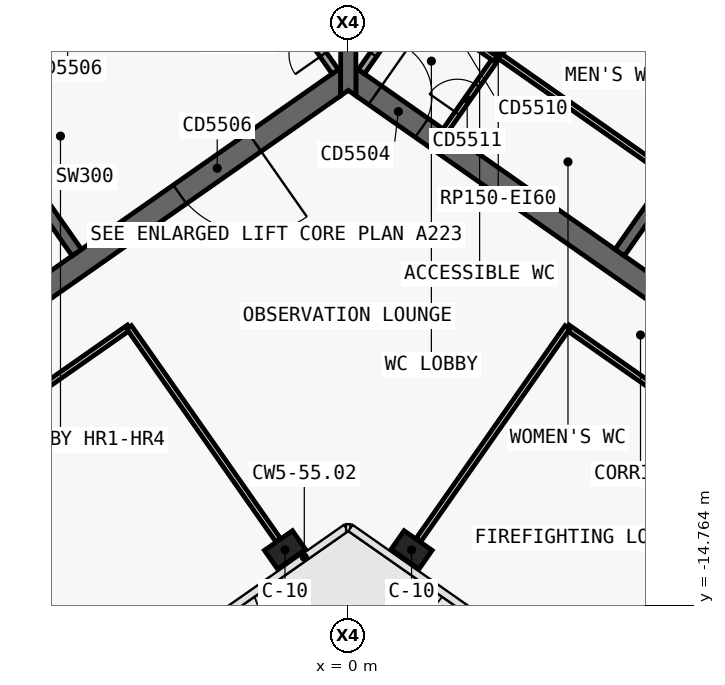
"""IFC4 building model, lengths in metres.
Left out: names, types, materials, properties, quantities, classifications, styles, units other than length and angle.
Written with IfcOpenShell. Run it as: python <this file> out.ifc"""

import sys

from ifc_helpers import new_model, si_unit, direction, frame, frame_2d, origin, origin_2d, place, context, subcontext, project, spatial, polyline, rectangle, outline, extrude, element, fill, save


model = new_model("IFC4")
c1 = context("Model", 3, precision=1e-05, world=origin(), true_north=direction((0.0, 1.0)))
c2 = subcontext(c1, "Body", "Model", "MODEL_VIEW")
j1 = project(units=[si_unit("LENGTHUNIT", "METRE"), si_unit("PLANEANGLEUNIT", "RADIAN")], contexts=[c1])
p1 = place(None, origin())
s1 = spatial("IfcSite", under=j1, at=p1, CompositionType="ELEMENT")
p2 = place(p1, origin())
s2 = spatial("IfcBuilding", under=s1, at=p2, CompositionType="ELEMENT")
p3 = place(p2, frame((0.0, 0.0, 307.3)))
s3 = spatial("IfcBuildingStorey", under=s2, at=p3, CompositionType="ELEMENT", Elevation=307.3)
p4 = place(p3, frame((-0.028, 12.066, 0.0), z_axis=(0.0, 0.0, 1.0), x_axis=(-0.819151382952, -0.573577380837, 0.0)))
e1 = element("IfcWall", 1, at=p4, inside=s3, PredefinedType="SHEAR", context=c2, shape_type="SweptSolid", body=[
    extrude(outline(polyline([(33.898, 0.3), (0.42, 0.3), (0.0, -0.3), (33.898, -0.3), (33.898, 0.3)])), origin(), (0.0, 0.0, 1.0), 6.0),
])
p5 = place(p3, frame((-0.028, -0.874, 0.0), z_axis=(0.0, 0.0, 1.0), x_axis=(-0.819150035022, -0.573579305871, 0.0)))
e2 = element("IfcWall", 2, at=p5, inside=s3, PredefinedType="SHEAR", context=c2, shape_type="SweptSolid", body=[
    extrude(outline(polyline([(26.476, 0.3), (0.42, 0.3), (0.0, -0.3), (26.476, -0.3), (26.476, 0.3)])), origin(), (0.0, 0.0, 1.0), 6.0),
])
p6 = place(p5, frame((2.976, 0.0, 0.0)))
e3 = element("IfcOpeningElement", 3, at=p6, cuts=e2, PredefinedType="OPENING", context=c2, shape_type="SweptSolid", body=[
    extrude(rectangle(XDim=2.4, YDim=2.1, at=frame_2d((1.2, 1.05))), frame((0.0, 0.31, 0.0), z_axis=(0.0, -1.0, 0.0), x_axis=(1.0, 0.0, 0.0)), (0.0, 0.0, 1.0), 0.62),
])
p7 = place(p5, frame((11.776, 0.0, 0.0)))
e4 = element("IfcOpeningElement", 4, at=p7, cuts=e2, PredefinedType="OPENING", context=c2, shape_type="SweptSolid", body=[
    extrude(rectangle(XDim=2.4, YDim=2.1, at=frame_2d((1.2, 1.05))), frame((0.0, 0.31, 0.0), z_axis=(0.0, -1.0, 0.0), x_axis=(1.0, 0.0, 0.0)), (0.0, 0.0, 1.0), 0.62),
])
p8 = place(p3, frame((-7.143, -5.49, 0.0), z_axis=(0.0, 0.0, 1.0), x_axis=(-0.573617744349, 0.819123118565, 0.0)))
e5 = element("IfcWall", 5, at=p8, inside=s3, PredefinedType="SHEAR", context=c2, shape_type="SweptSolid", body=[
    extrude(outline(polyline([(4.85, 0.15), (0.0, 0.15), (0.0, -0.15), (4.85, -0.15), (4.85, 0.15)])), origin(), (0.0, 0.0, 1.0), 6.0),
])
p9 = place(p3, frame((-2.638, 3.768, 0.0), z_axis=(0.0, 0.0, 1.0), x_axis=(-0.819155014212, -0.573572194837, 0.0)))
e6 = element("IfcWall", 6, at=p9, inside=s3, PredefinedType="SHEAR", context=c2, shape_type="SweptSolid", body=[
    extrude(outline(polyline([(26.4, 0.15), (0.0, 0.15), (0.0, -0.15), (26.4, -0.15), (26.4, 0.15)])), origin(), (0.0, 0.0, 1.0), 6.0),
])
p10 = place(p9, frame((1.169, 0.0, 0.0)))
e7 = element("IfcOpeningElement", 7, at=p10, cuts=e6, PredefinedType="OPENING", context=c2, shape_type="SweptSolid", body=[
    extrude(rectangle(XDim=1.1, YDim=2.1, at=frame_2d((0.55, 1.05))), frame((0.0, 0.16, 0.0), z_axis=(0.0, -1.0, 0.0), x_axis=(1.0, 0.0, 0.0)), (0.0, 0.0, 1.0), 0.32),
])
p11 = place(p9, frame((3.206, 0.0, 0.0)))
e8 = element("IfcOpeningElement", 8, at=p11, cuts=e6, PredefinedType="OPENING", context=c2, shape_type="SweptSolid", body=[
    extrude(rectangle(XDim=1.1, YDim=2.1, at=frame_2d((0.55, 1.05))), frame((0.0, 0.16, 0.0), z_axis=(0.0, -1.0, 0.0), x_axis=(1.0, 0.0, 0.0)), (0.0, 0.0, 1.0), 0.32),
])
p12 = place(p9, frame((5.244, 0.0, 0.0)))
e9 = element("IfcOpeningElement", 9, at=p12, cuts=e6, PredefinedType="OPENING", context=c2, shape_type="SweptSolid", body=[
    extrude(rectangle(XDim=1.1, YDim=2.1, at=frame_2d((0.55, 1.05))), frame((0.0, 0.16, 0.0), z_axis=(0.0, -1.0, 0.0), x_axis=(1.0, 0.0, 0.0)), (0.0, 0.0, 1.0), 0.32),
])
p13 = place(p9, frame((7.281, 0.0, 0.0)))
e10 = element("IfcOpeningElement", 10, at=p13, cuts=e6, PredefinedType="OPENING", context=c2, shape_type="SweptSolid", body=[
    extrude(rectangle(XDim=1.1, YDim=2.1, at=frame_2d((0.55, 1.05))), frame((0.0, 0.16, 0.0), z_axis=(0.0, -1.0, 0.0), x_axis=(1.0, 0.0, 0.0)), (0.0, 0.0, 1.0), 0.32),
])
p14 = place(p9, frame((9.688, 0.0, 0.0)))
e11 = element("IfcOpeningElement", 11, at=p14, cuts=e6, PredefinedType="OPENING", context=c2, shape_type="SweptSolid", body=[
    extrude(rectangle(XDim=1.1, YDim=2.1, at=frame_2d((0.55, 1.05))), frame((0.0, 0.16, 0.0), z_axis=(0.0, -1.0, 0.0), x_axis=(1.0, 0.0, 0.0)), (0.0, 0.0, 1.0), 0.32),
])
p15 = place(p9, frame((11.863, 0.0, 0.0)))
e12 = element("IfcOpeningElement", 12, at=p15, cuts=e6, PredefinedType="OPENING", context=c2, shape_type="SweptSolid", body=[
    extrude(rectangle(XDim=1.1, YDim=2.1, at=frame_2d((0.55, 1.05))), frame((0.0, 0.16, 0.0), z_axis=(0.0, -1.0, 0.0), x_axis=(1.0, 0.0, 0.0)), (0.0, 0.0, 1.0), 0.32),
])
p16 = place(p9, frame((15.175, 0.0, 0.0)))
e13 = element("IfcOpeningElement", 13, at=p16, cuts=e6, PredefinedType="OPENING", context=c2, shape_type="SweptSolid", body=[
    extrude(rectangle(XDim=1.0, YDim=2.1, at=frame_2d((0.5, 1.05))), frame((0.0, 0.16, 0.0), z_axis=(0.0, -1.0, 0.0), x_axis=(1.0, 0.0, 0.0)), (0.0, 0.0, 1.0), 0.32),
])
p17 = place(p3, frame((0.028, 12.066, 0.0), z_axis=(0.0, 0.0, 1.0), x_axis=(0.819151382952, -0.573577380837, 0.0)))
e14 = element("IfcWall", 14, at=p17, inside=s3, PredefinedType="SHEAR", context=c2, shape_type="SweptSolid", body=[
    extrude(outline(polyline([(33.898, 0.3), (0.0, 0.3), (0.42, -0.3), (33.898, -0.3), (33.898, 0.3)])), origin(), (0.0, 0.0, 1.0), 6.0),
])
p18 = place(p3, frame((0.028, -0.874, 0.0), z_axis=(0.0, 0.0, 1.0), x_axis=(0.819150035022, -0.573579305871, 0.0)))
e15 = element("IfcWall", 15, at=p18, inside=s3, PredefinedType="SHEAR", context=c2, shape_type="SweptSolid", body=[
    extrude(outline(polyline([(26.476, 0.3), (0.0, 0.3), (0.42, -0.3), (26.476, -0.3), (26.476, 0.3)])), origin(), (0.0, 0.0, 1.0), 6.0),
])
p19 = place(p18, frame((0.826, 0.0, 0.0)))
e16 = element("IfcOpeningElement", 16, at=p19, cuts=e15, PredefinedType="OPENING", context=c2, shape_type="SweptSolid", body=[
    extrude(rectangle(XDim=1.5, YDim=2.1, at=frame_2d((0.75, 1.05))), frame((0.0, 0.31, 0.0), z_axis=(0.0, -1.0, 0.0), x_axis=(1.0, 0.0, 0.0)), (0.0, 0.0, 1.0), 0.62),
])
p20 = place(p18, frame((12.226, 0.0, 0.0)))
e17 = element("IfcOpeningElement", 17, at=p20, cuts=e15, PredefinedType="OPENING", context=c2, shape_type="SweptSolid", body=[
    extrude(rectangle(XDim=1.5, YDim=2.1, at=frame_2d((0.75, 1.05))), frame((0.0, 0.31, 0.0), z_axis=(0.0, -1.0, 0.0), x_axis=(1.0, 0.0, 0.0)), (0.0, 0.0, 1.0), 0.62),
])
p21 = place(p3, frame((7.143, -5.49, 0.0), z_axis=(0.0, 0.0, 1.0), x_axis=(0.573617744349, 0.819123118565, 0.0)))
e18 = element("IfcWall", 18, at=p21, inside=s3, PredefinedType="SHEAR", context=c2, shape_type="SweptSolid", body=[
    extrude(outline(polyline([(0.0, 0.15), (0.0, -0.15), (4.85, -0.15), (4.85, 0.15), (0.0, 0.15)])), origin(), (0.0, 0.0, 1.0), 6.0),
])
p22 = place(p3, frame((2.638, 3.768, 0.0), z_axis=(0.0, 0.0, 1.0), x_axis=(0.819155014212, -0.573572194837, 0.0)))
e19 = element("IfcWall", 19, at=p22, inside=s3, PredefinedType="SHEAR", context=c2, shape_type="SweptSolid", body=[
    extrude(outline(polyline([(0.0, 0.15), (0.0, -0.15), (26.4, -0.15), (26.4, 0.15), (0.0, 0.15)])), origin(), (0.0, 0.0, 1.0), 6.0),
])
p23 = place(p22, frame((9.637, 0.0, 0.0)))
e20 = element("IfcOpeningElement", 20, at=p23, cuts=e19, PredefinedType="OPENING", context=c2, shape_type="SweptSolid", body=[
    extrude(rectangle(XDim=1.2, YDim=2.1, at=frame_2d((0.6, 1.05))), frame((0.0, 0.16, 0.0), z_axis=(0.0, -1.0, 0.0), x_axis=(1.0, 0.0, 0.0)), (0.0, 0.0, 1.0), 0.32),
])
p24 = place(p22, frame((11.812, 0.0, 0.0)))
e21 = element("IfcOpeningElement", 21, at=p24, cuts=e19, PredefinedType="OPENING", context=c2, shape_type="SweptSolid", body=[
    extrude(rectangle(XDim=1.2, YDim=2.1, at=frame_2d((0.6, 1.05))), frame((0.0, 0.16, 0.0), z_axis=(0.0, -1.0, 0.0), x_axis=(1.0, 0.0, 0.0)), (0.0, 0.0, 1.0), 0.32),
])
p25 = place(p22, frame((13.988, 0.0, 0.0)))
e22 = element("IfcOpeningElement", 22, at=p25, cuts=e19, PredefinedType="OPENING", context=c2, shape_type="SweptSolid", body=[
    extrude(rectangle(XDim=1.2, YDim=2.1, at=frame_2d((0.6, 1.05))), frame((0.0, 0.16, 0.0), z_axis=(0.0, -1.0, 0.0), x_axis=(1.0, 0.0, 0.0)), (0.0, 0.0, 1.0), 0.32),
])
p26 = place(p22, frame((16.262, 0.0, 0.0)))
e23 = element("IfcOpeningElement", 23, at=p26, cuts=e19, PredefinedType="OPENING", context=c2, shape_type="SweptSolid", body=[
    extrude(rectangle(XDim=1.0, YDim=2.1, at=frame_2d((0.5, 1.05))), frame((0.0, 0.16, 0.0), z_axis=(0.0, -1.0, 0.0), x_axis=(1.0, 0.0, 0.0)), (0.0, 0.0, 1.0), 0.32),
])
p27 = place(p3, frame((0.0, -1.361, 0.0), z_axis=(0.0, 0.0, 1.0), x_axis=(0.0, 1.0, 0.0)))
e24 = element("IfcWall", 24, at=p27, inside=s3, PredefinedType="SHEAR", context=c2, shape_type="SweptSolid", body=[
    extrude(outline(polyline([(0.14, 0.2), (0.0, 0.2), (0.14, 0.0), (0.0, -0.2), (0.14, -0.2), (1.012, -0.2), (12.94, -0.2), (13.813, -0.2), (13.893, -0.2), (13.933, -0.172), (13.813, 0.0), (13.933, 0.172), (13.893, 0.2), (13.813, 0.2), (12.94, 0.2), (1.012, 0.2), (0.14, 0.2)])), origin(), (0.0, 0.0, 1.0), 6.0),
])
for number, where, z_axis, x_axis in (
    (25, (-1.665, -13.313, 0.0), (0.0, 0.0, 1.0), (-0.819, -0.574, 0.0)),
    (26, (1.665, -13.313, 0.0), (0.0, 0.0, 1.0), (0.819, -0.574, 0.0)),
):
    element("IfcColumn", number, at=place(p3, frame(where, z_axis=z_axis, x_axis=x_axis)), inside=s3, PredefinedType="COLUMN", context=c2, shape_type="SweptSolid", body=[
        extrude(rectangle(XDim=0.9, YDim=0.6, at=origin_2d()), origin(), (0.0, 0.0, 1.0), 6.0),
    ])
p28 = place(p3, frame((2.556, -2.278, 0.0), z_axis=(0.0, 0.0, 1.0), x_axis=(0.573560315113, 0.819163332265, 0.0)))
e27 = element("IfcWall", 27, at=p28, inside=s3, PredefinedType="PARTITIONING", context=c2, shape_type="SweptSolid", body=[
    extrude(rectangle(XDim=4.85, YDim=0.15, at=frame_2d((2.425, 0.0))), origin(), (0.0, 0.0, 1.0), 5.72),
])
p29 = place(p28, frame((0.55, 0.0, 0.0)))
e28 = element("IfcOpeningElement", 28, at=p29, cuts=e27, PredefinedType="OPENING", context=c2, shape_type="SweptSolid", body=[
    extrude(rectangle(XDim=0.9, YDim=2.1, at=frame_2d((0.45, 1.05))), frame((0.0, 0.085, 0.0), z_axis=(0.0, -1.0, 0.0), x_axis=(1.0, 0.0, 0.0)), (0.0, 0.0, 1.0), 0.17),
])
p30 = place(p28, frame((3.075, 0.0, 0.0)))
e29 = element("IfcOpeningElement", 29, at=p30, cuts=e27, PredefinedType="OPENING", context=c2, shape_type="SweptSolid", body=[
    extrude(rectangle(XDim=0.9, YDim=2.1, at=frame_2d((0.45, 1.05))), frame((0.0, 0.085, 0.0), z_axis=(0.0, -1.0, 0.0), x_axis=(1.0, 0.0, 0.0)), (0.0, 0.0, 1.0), 0.17),
])
p31 = place(p3, frame((1.745, 1.097, 0.0), z_axis=(0.0, 0.0, 1.0), x_axis=(0.819178980414, -0.573537965655, 0.0)))
e30 = element("IfcWall", 30, at=p31, inside=s3, PredefinedType="PARTITIONING", context=c2, shape_type="SweptSolid", body=[
    extrude(rectangle(XDim=2.6, YDim=0.15, at=frame_2d((1.3, 0.0))), origin(), (0.0, 0.0, 1.0), 5.72),
])
p32 = place(p31, frame((0.85, 0.0, 0.0)))
e31 = element("IfcOpeningElement", 31, at=p32, cuts=e30, PredefinedType="OPENING", context=c2, shape_type="SweptSolid", body=[
    extrude(rectangle(XDim=0.9, YDim=2.1, at=frame_2d((0.45, 1.05))), frame((0.0, 0.085, 0.0), z_axis=(0.0, -1.0, 0.0), x_axis=(1.0, 0.0, 0.0)), (0.0, 0.0, 1.0), 0.17),
])
p33 = place(p3, frame((3.947, -0.292, 0.0), z_axis=(0.0, 0.0, 1.0), x_axis=(0.819151939971, -0.573576585332, 0.0)))
e32 = element("IfcWall", 32, at=p33, inside=s3, PredefinedType="PARTITIONING", context=c2, shape_type="SweptSolid", body=[
    extrude(rectangle(XDim=5.45, YDim=0.15, at=frame_2d((2.725, 0.0))), origin(), (0.0, 0.0, 1.0), 5.72),
])
p34 = place(p3, frame((-0.344, -0.729, 0.0), z_axis=(0.0, 0.0, 1.0), x_axis=(-0.573560315113, 0.819163332265, 0.0)))
e33 = element("IfcWall", 33, at=p34, inside=s3, PredefinedType="SOLIDWALL", context=c2, shape_type="SweptSolid", body=[
    extrude(rectangle(XDim=4.85, YDim=0.2, at=frame_2d((2.425, 0.0))), origin(), (0.0, 0.0, 1.0), 5.72),
])
p35 = place(p34, frame((0.55, 0.0, 0.0)))
e34 = element("IfcOpeningElement", 34, at=p35, cuts=e33, PredefinedType="OPENING", context=c2, shape_type="SweptSolid", body=[
    extrude(rectangle(XDim=0.9, YDim=2.1, at=frame_2d((0.45, 1.05))), frame((0.0, 0.11, 0.0), z_axis=(0.0, -1.0, 0.0), x_axis=(1.0, 0.0, 0.0)), (0.0, 0.0, 1.0), 0.22),
])
p36 = place(p3, frame((0.344, -0.729, 0.0), z_axis=(0.0, 0.0, 1.0), x_axis=(0.573560315113, 0.819163332265, 0.0)))
e35 = element("IfcWall", 35, at=p36, inside=s3, PredefinedType="SOLIDWALL", context=c2, shape_type="SweptSolid", body=[
    extrude(rectangle(XDim=4.85, YDim=0.2, at=frame_2d((2.425, 0.0))), origin(), (0.0, 0.0, 1.0), 5.72),
])
p37 = place(p36, frame((0.55, 0.0, 0.0)))
e36 = element("IfcOpeningElement", 36, at=p37, cuts=e35, PredefinedType="OPENING", context=c2, shape_type="SweptSolid", body=[
    extrude(rectangle(XDim=0.9, YDim=2.1, at=frame_2d((0.45, 1.05))), frame((0.0, 0.11, 0.0), z_axis=(0.0, -1.0, 0.0), x_axis=(1.0, 0.0, 0.0)), (0.0, 0.0, 1.0), 0.22),
])
p38 = place(p3, frame((20.513, -17.781, 0.0), z_axis=(0.0, 0.0, 1.0), x_axis=(-0.819153544995, 0.573574293115, 0.0)))
e37 = element("IfcWall", 37, at=p38, inside=s3, PredefinedType="PARTITIONING", context=c2, shape_type="SweptSolid", body=[
    extrude(rectangle(XDim=18.002, YDim=0.15, at=frame_2d((9.001, 0.0))), origin(), (0.0, 0.0, 1.0), 5.15),
])
p39 = place(p38, frame((8.401, 0.0, 0.0)))
e38 = element("IfcOpeningElement", 38, at=p39, cuts=e37, PredefinedType="OPENING", context=c2, shape_type="SweptSolid", body=[
    extrude(rectangle(XDim=1.2, YDim=2.4, at=frame_2d((0.6, 1.2))), frame((0.0, 0.085, 0.0), z_axis=(0.0, -1.0, 0.0), x_axis=(1.0, 0.0, 0.0)), (0.0, 0.0, 1.0), 0.17),
])
p40 = place(p3, frame((-5.766, -7.456, 0.0), z_axis=(0.0, 0.0, 1.0), x_axis=(-0.819153544995, -0.573574293115, 0.0)))
e39 = element("IfcWall", 39, at=p40, inside=s3, PredefinedType="PARTITIONING", context=c2, shape_type="SweptSolid", body=[
    extrude(rectangle(XDim=18.002, YDim=0.15, at=frame_2d((9.001, 0.0))), origin(), (0.0, 0.0, 1.0), 5.15),
])
p41 = place(p40, frame((8.401, 0.0, 0.0)))
e40 = element("IfcOpeningElement", 40, at=p41, cuts=e39, PredefinedType="OPENING", context=c2, shape_type="SweptSolid", body=[
    extrude(rectangle(XDim=1.2, YDim=2.4, at=frame_2d((0.6, 1.2))), frame((0.0, 0.085, 0.0), z_axis=(0.0, -1.0, 0.0), x_axis=(1.0, 0.0, 0.0)), (0.0, 0.0, 1.0), 0.17),
])
p42 = place(p3, frame((1.849, -13.051, 0.0), z_axis=(0.0, 0.0, 1.0), x_axis=(0.573577493031, 0.819151304393, 0.0)))
e41 = element("IfcWall", 41, at=p42, inside=s3, PredefinedType="PARTITIONING", context=c2, shape_type="SweptSolid", body=[
    extrude(rectangle(XDim=6.83, YDim=0.15, at=frame_2d((3.415, 0.0))), origin(), (0.0, 0.0, 1.0), 5.15),
])
p43 = place(p3, frame((-1.849, -13.051, 0.0), z_axis=(0.0, 0.0, 1.0), x_axis=(-0.57357985571, 0.819149650018, 0.0)))
e42 = element("IfcWall", 42, at=p43, inside=s3, PredefinedType="PARTITIONING", context=c2, shape_type="SweptSolid", body=[
    extrude(rectangle(XDim=6.832, YDim=0.15, at=frame_2d((3.416, 0.0))), origin(), (0.0, 0.0, 1.0), 5.15),
])
p44 = place(p6, origin())
e43 = element("IfcDoor", 43, at=p44, inside=s3, OperationType="DOUBLE_DOOR_SINGLE_SWING", PredefinedType="DOOR", context=c2, shape_type="SweptSolid", body=[
    extrude(rectangle(XDim=2.4, YDim=2.1, at=frame_2d((1.2, 1.05))), frame((0.0, 0.025, 0.0), z_axis=(0.0, -1.0, 0.0), x_axis=(1.0, 0.0, 0.0)), (0.0, 0.0, 1.0), 0.05),
])
fill(e3, e43)
p45 = place(p29, origin())
e44 = element("IfcDoor", 44, at=p45, inside=s3, OperationType="SINGLE_SWING_RIGHT", PredefinedType="DOOR", context=c2, shape_type="SweptSolid", body=[
    extrude(rectangle(XDim=0.9, YDim=2.1, at=frame_2d((0.45, 1.05))), frame((0.0, 0.025, 0.0), z_axis=(0.0, -1.0, 0.0), x_axis=(1.0, 0.0, 0.0)), (0.0, 0.0, 1.0), 0.05),
])
fill(e28, e44)
p46 = place(p19, origin())
e45 = element("IfcDoor", 45, at=p46, inside=s3, OperationType="SINGLE_SWING_RIGHT", PredefinedType="DOOR", context=c2, shape_type="SweptSolid", body=[
    extrude(rectangle(XDim=1.5, YDim=2.1, at=frame_2d((0.75, 1.05))), frame((0.0, 0.025, 0.0), z_axis=(0.0, -1.0, 0.0), x_axis=(1.0, 0.0, 0.0)), (0.0, 0.0, 1.0), 0.05),
])
fill(e16, e45)
p47 = place(p35, origin())
e46 = element("IfcDoor", 46, at=p47, inside=s3, OperationType="SINGLE_SWING_RIGHT", PredefinedType="DOOR", context=c2, shape_type="SweptSolid", body=[
    extrude(rectangle(XDim=0.9, YDim=2.1, at=frame_2d((0.45, 1.05))), frame((0.0, 0.025, 0.0), z_axis=(0.0, -1.0, 0.0), x_axis=(1.0, 0.0, 0.0)), (0.0, 0.0, 1.0), 0.05),
])
fill(e34, e46)
p48 = place(p37, origin())
e47 = element("IfcDoor", 47, at=p48, inside=s3, OperationType="SINGLE_SWING_RIGHT", PredefinedType="DOOR", context=c2, shape_type="SweptSolid", body=[
    extrude(rectangle(XDim=0.9, YDim=2.1, at=frame_2d((0.45, 1.05))), frame((0.0, 0.025, 0.0), z_axis=(0.0, -1.0, 0.0), x_axis=(1.0, 0.0, 0.0)), (0.0, 0.0, 1.0), 0.05),
])
fill(e36, e47)
save(model, sys.argv[1])
